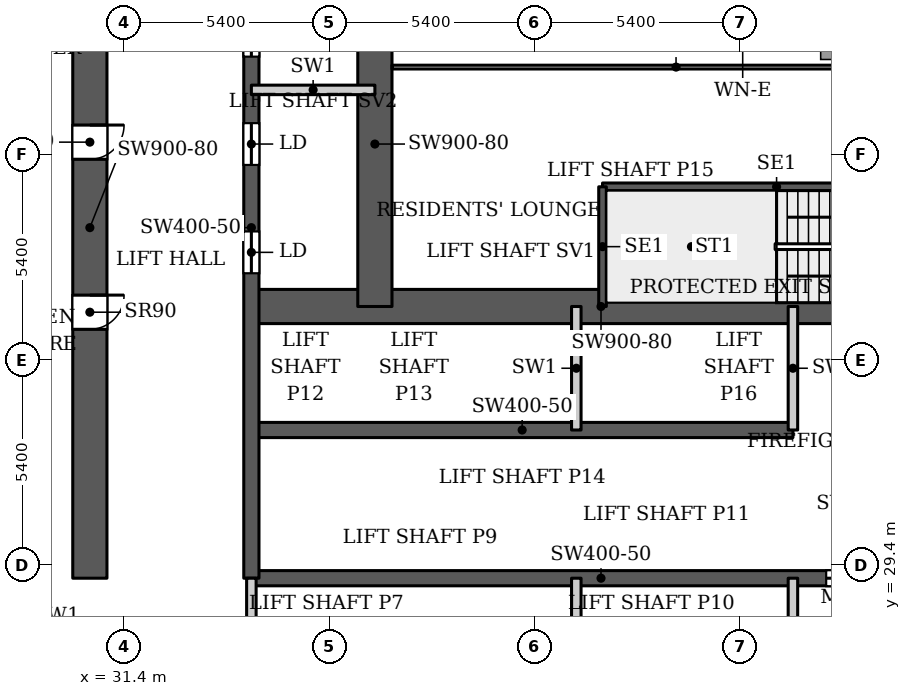
"""IFC4 building model, lengths in metres.
Left out: names, types, materials, properties, quantities, classifications, styles, units other than length and angle.
Written with IfcOpenShell. Run it as: python <this file> out.ifc"""

import sys

from ifc_helpers import new_model, si_unit, direction, frame, frame_2d, origin, place, context, subcontext, project, spatial, rectangle, extrude, source, transform, mapped, element, fill, save


model = new_model("IFC4")
c1 = context("Model", 3, precision=1e-05, world=origin(), true_north=direction((0.0, 1.0)))
c2 = subcontext(c1, "Body", "Model", "MODEL_VIEW")
j1 = project(units=[si_unit("LENGTHUNIT", "METRE"), si_unit("PLANEANGLEUNIT", "RADIAN")], contexts=[c1])
p1 = place(None, origin())
s1 = spatial("IfcSite", under=j1, at=p1, CompositionType="ELEMENT")
p2 = place(p1, origin())
s2 = spatial("IfcBuilding", under=s1, at=p2, CompositionType="ELEMENT")
p3 = place(p2, frame((0.0, 0.0, 125.3)))
s3 = spatial("IfcBuildingStorey", under=s2, at=p3, CompositionType="ELEMENT", Elevation=125.3)
p4 = place(p3, frame((34.75, 29.05, 0.0), z_axis=(0.0, 0.0, 1.0), x_axis=(1.0, 0.0, 0.0)))
e1 = element("IfcWall", 1, at=p4, inside=s3, PredefinedType="SHEAR", context=c2, shape_type="SweptSolid", body=[
    extrude(rectangle(XDim=18.4, YDim=0.4, at=frame_2d((9.2, 0.0))), origin(), (0.0, 0.0, 1.0), 3.9),
])
p5 = place(p4, frame((15.125, 0.0, 0.0)))
e2 = element("IfcOpeningElement", 2, at=p5, cuts=e1, PredefinedType="OPENING", context=c2, shape_type="SweptSolid", body=[
    extrude(rectangle(XDim=1.1, YDim=2.2, at=frame_2d((0.55, 1.1))), frame((0.0, 0.21, 0.0), z_axis=(0.0, -1.0, 0.0), x_axis=(1.0, 0.0, 0.0)), (0.0, 0.0, 1.0), 0.42),
])
p6 = place(p3, frame((34.75, 32.95, 0.0), z_axis=(0.0, 0.0, 1.0), x_axis=(1.0, 0.0, 0.0)))
e3 = element("IfcWall", 3, at=p6, inside=s3, PredefinedType="SHEAR", context=c2, shape_type="SweptSolid", body=[
    extrude(rectangle(XDim=14.25, YDim=0.4, at=frame_2d((7.125, 0.0))), origin(), (0.0, 0.0, 1.0), 3.9),
])
p7 = place(p3, frame((34.75, 36.2, 0.0), z_axis=(0.0, 0.0, 1.0), x_axis=(1.0, 0.0, 0.0)))
e4 = element("IfcWall", 4, at=p7, inside=s3, PredefinedType="SHEAR", context=c2, shape_type="SweptSolid", body=[
    extrude(rectangle(XDim=18.4, YDim=0.9, at=frame_2d((9.2, 0.0))), origin(), (0.0, 0.0, 1.0), 3.9),
])
p8 = place(p7, frame((16.9, 0.0, 0.0)))
e5 = element("IfcOpeningElement", 5, at=p8, cuts=e4, PredefinedType="OPENING", context=c2, shape_type="SweptSolid", body=[
    extrude(rectangle(XDim=1.0, YDim=2.2, at=frame_2d((0.5, 1.1))), frame((0.0, 0.46, 0.0), z_axis=(0.0, -1.0, 0.0), x_axis=(1.0, 0.0, 0.0)), (0.0, 0.0, 1.0), 0.92),
])
p9 = place(p3, frame((34.75, 29.05, 0.0), z_axis=(0.0, 0.0, 1.0), x_axis=(0.0, 1.0, 0.0)))
e6 = element("IfcWall", 6, at=p9, inside=s3, PredefinedType="SHEAR", context=c2, shape_type="SweptSolid", body=[
    extrude(rectangle(XDim=18.45, YDim=0.4, at=frame_2d((9.225, 0.0))), origin(), (0.0, 0.0, 1.0), 3.9),
])
p10 = place(p9, frame((8.025, 0.0, 0.0)))
e7 = element("IfcOpeningElement", 7, at=p10, cuts=e6, PredefinedType="OPENING", context=c2, shape_type="SweptSolid", body=[
    extrude(rectangle(XDim=1.1, YDim=2.2, at=frame_2d((0.55, 1.1))), frame((0.0, 0.21, 0.0), z_axis=(0.0, -1.0, 0.0), x_axis=(1.0, 0.0, 0.0)), (0.0, 0.0, 1.0), 0.42),
])
p11 = place(p9, frame((10.875, 0.0, 0.0)))
e8 = element("IfcOpeningElement", 8, at=p11, cuts=e6, PredefinedType="OPENING", context=c2, shape_type="SweptSolid", body=[
    extrude(rectangle(XDim=1.1, YDim=2.2, at=frame_2d((0.55, 1.1))), frame((0.0, 0.21, 0.0), z_axis=(0.0, -1.0, 0.0), x_axis=(1.0, 0.0, 0.0)), (0.0, 0.0, 1.0), 0.42),
])
p12 = place(p9, frame((13.725, 0.0, 0.0)))
e9 = element("IfcOpeningElement", 9, at=p12, cuts=e6, PredefinedType="OPENING", context=c2, shape_type="SweptSolid", body=[
    extrude(rectangle(XDim=1.1, YDim=2.2, at=frame_2d((0.55, 1.1))), frame((0.0, 0.21, 0.0), z_axis=(0.0, -1.0, 0.0), x_axis=(1.0, 0.0, 0.0)), (0.0, 0.0, 1.0), 0.42),
])
p13 = place(p9, frame((15.95, 0.0, 0.0)))
e10 = element("IfcOpeningElement", 10, at=p13, cuts=e6, PredefinedType="OPENING", context=c2, shape_type="SweptSolid", body=[
    extrude(rectangle(XDim=1.1, YDim=2.2, at=frame_2d((0.55, 1.1))), frame((0.0, 0.21, 0.0), z_axis=(0.0, -1.0, 0.0), x_axis=(1.0, 0.0, 0.0)), (0.0, 0.0, 1.0), 0.42),
])
p14 = place(p3, frame((38.0, 36.2, 0.0), z_axis=(0.0, 0.0, 1.0), x_axis=(0.0, 1.0, 0.0)))
e11 = element("IfcWall", 11, at=p14, inside=s3, PredefinedType="SHEAR", context=c2, shape_type="SweptSolid", body=[
    extrude(rectangle(XDim=8.55, YDim=0.9, at=frame_2d((4.275, 0.0))), origin(), (0.0, 0.0, 1.0), 3.9),
])
p15 = place(p3, frame((30.5, 29.05, 0.0), z_axis=(0.0, 0.0, 1.0), x_axis=(0.0, 1.0, 0.0)))
e12 = element("IfcWall", 12, at=p15, inside=s3, PredefinedType="SHEAR", context=c2, shape_type="SweptSolid", body=[
    extrude(rectangle(XDim=18.45, YDim=0.9, at=frame_2d((9.225, 0.0))), origin(), (0.0, 0.0, 1.0), 3.9),
])
p16 = place(p15, frame((6.55, 0.0, 0.0)))
e13 = element("IfcOpeningElement", 13, at=p16, cuts=e12, PredefinedType="OPENING", context=c2, shape_type="SweptSolid", body=[
    extrude(rectangle(XDim=0.9, YDim=2.2, at=frame_2d((0.45, 1.1))), frame((0.0, 0.46, 0.0), z_axis=(0.0, -1.0, 0.0), x_axis=(1.0, 0.0, 0.0)), (0.0, 0.0, 1.0), 0.92),
])
p17 = place(p15, frame((11.025, 0.0, 0.0)))
e14 = element("IfcOpeningElement", 14, at=p17, cuts=e12, PredefinedType="OPENING", context=c2, shape_type="SweptSolid", body=[
    extrude(rectangle(XDim=0.9, YDim=2.2, at=frame_2d((0.45, 1.1))), frame((0.0, 0.46, 0.0), z_axis=(0.0, -1.0, 0.0), x_axis=(1.0, 0.0, 0.0)), (0.0, 0.0, 1.0), 0.92),
])
p18 = place(p3, frame((29.712, 26.072, 0.0), z_axis=(0.0, 0.0, 1.0), x_axis=(-0.511028049012, 0.859564036662, 0.0)))
e15 = element("IfcWall", 15, at=p18, inside=s3, PredefinedType="SOLIDWALL", context=c2, shape_type="SweptSolid", body=[
    extrude(rectangle(XDim=4.634, YDim=0.25, at=frame_2d((2.317, 0.0))), origin(), (0.0, 0.0, 1.0), 3.147),
])
p19 = place(p3, frame((27.195, 31.969, 0.0), z_axis=(0.0, 0.0, 1.0), x_axis=(0.052554995867, 0.998618031286, 0.0)))
e16 = element("IfcWall", 16, at=p19, inside=s3, PredefinedType="SOLIDWALL", context=c2, shape_type="SweptSolid", body=[
    extrude(rectangle(XDim=66.787, YDim=0.25, at=frame_2d((33.394, 0.0))), origin(), (0.0, 0.0, 1.0), 3.75),
])
p20 = place(p3, frame((43.99, 39.35, 0.0), z_axis=(0.0, 0.0, 1.0), x_axis=(1.0, 0.0, 0.0)))
e17 = element("IfcWall", 17, at=p20, inside=s3, PredefinedType="SHEAR", context=c2, shape_type="SweptSolid", body=[
    extrude(rectangle(XDim=9.16, YDim=0.2, at=frame_2d((4.58, 0.0))), origin(), (0.0, 0.0, 1.0), 3.9),
])
p21 = place(p3, frame((43.99, 36.2, 0.0), z_axis=(0.0, 0.0, 1.0), x_axis=(0.0, 1.0, 0.0)))
e18 = element("IfcWall", 18, at=p21, inside=s3, PredefinedType="SHEAR", context=c2, shape_type="SweptSolid", body=[
    extrude(rectangle(XDim=3.15, YDim=0.2, at=frame_2d((1.575, 0.0))), origin(), (0.0, 0.0, 1.0), 3.9),
])
for number, where, z_axis, x_axis in (
    (19, (34.75, 25.8, 0.0), (0.0, 0.0, 1.0), (0.0, 1.0, 0.0)),
    (20, (43.3, 25.8, 0.0), (0.0, 0.0, 1.0), (0.0, 1.0, 0.0)),
    (21, (43.3, 32.95, 0.0), (0.0, 0.0, 1.0), (0.0, 1.0, 0.0)),
    (22, (49.0, 25.8, 0.0), (0.0, 0.0, 1.0), (0.0, 1.0, 0.0)),
    (23, (49.0, 32.95, 0.0), (0.0, 0.0, 1.0), (0.0, 1.0, 0.0)),
    (24, (34.75, 41.9, 0.0), (0.0, 0.0, 1.0), (1.0, 0.0, 0.0)),
):
    element("IfcWall", number, at=place(p3, frame(where, z_axis=z_axis, x_axis=x_axis)), inside=s3, PredefinedType="PARTITIONING", context=c2, shape_type="SweptSolid", body=[
        extrude(rectangle(XDim=3.25, YDim=0.25, at=frame_2d((1.625, 0.0))), origin(), (0.0, 0.0, 1.0), 3.9),
    ])
p22 = place(p3, frame((38.449, 42.5, 0.0), z_axis=(0.0, 0.0, 1.0), x_axis=(1.0, 0.0, 0.0)))
e25 = element("IfcWall", 25, at=p22, inside=s3, PredefinedType="PARTITIONING", context=c2, shape_type="SweptSolid", body=[
    extrude(rectangle(XDim=14.951, YDim=0.1, at=frame_2d((7.476, 0.0))), origin(), (0.0, 0.0, 1.0), 3.6),
])
m1 = source(origin(), c2, "Body", "SweptSolid", [
    extrude(rectangle(XDim=1.1, YDim=2.2, at=frame_2d((0.55, 1.1))), frame((0.0, 0.025, 0.0), z_axis=(0.0, -1.0, 0.0), x_axis=(1.0, 0.0, 0.0)), (0.0, 0.0, 1.0), 0.05),
])
p23 = place(p10, origin())
e26 = element("IfcDoor", 26, at=p23, inside=s3, OperationType="SLIDING_TO_LEFT", PredefinedType="DOOR", context=c2, shape_type="MappedRepresentation", body=[
    mapped(m1, transform((0.0, 0.0, 0.0), x_axis=(1.0, 0.0, 0.0), y_axis=(0.0, 1.0, 0.0), z_axis=(0.0, 0.0, 1.0), scale=1.0)),
])
fill(e7, e26)
p24 = place(p11, origin())
e27 = element("IfcDoor", 27, at=p24, inside=s3, OperationType="SLIDING_TO_LEFT", PredefinedType="DOOR", context=c2, shape_type="MappedRepresentation", body=[
    mapped(m1, transform((0.0, 0.0, 0.0), x_axis=(1.0, 0.0, 0.0), y_axis=(0.0, 1.0, 0.0), z_axis=(0.0, 0.0, 1.0), scale=1.0)),
])
fill(e8, e27)
p25 = place(p12, origin())
e28 = element("IfcDoor", 28, at=p25, inside=s3, OperationType="SLIDING_TO_LEFT", PredefinedType="DOOR", context=c2, shape_type="MappedRepresentation", body=[
    mapped(m1, transform((0.0, 0.0, 0.0), x_axis=(1.0, 0.0, 0.0), y_axis=(0.0, 1.0, 0.0), z_axis=(0.0, 0.0, 1.0), scale=1.0)),
])
fill(e9, e28)
p26 = place(p5, origin())
e29 = element("IfcDoor", 29, at=p26, inside=s3, OperationType="SLIDING_TO_LEFT", PredefinedType="DOOR", context=c2, shape_type="MappedRepresentation", body=[
    mapped(m1, transform((0.0, 0.0, 0.0), x_axis=(1.0, 0.0, 0.0), y_axis=(0.0, 1.0, 0.0), z_axis=(0.0, 0.0, 1.0), scale=1.0)),
])
fill(e2, e29)
m2 = source(origin(), c2, "Body", "SweptSolid", [
    extrude(rectangle(XDim=0.9, YDim=2.2, at=frame_2d((0.45, 1.1))), frame((0.0, 0.025, 0.0), z_axis=(0.0, -1.0, 0.0), x_axis=(1.0, 0.0, 0.0)), (0.0, 0.0, 1.0), 0.05),
])
p27 = place(p16, origin())
e30 = element("IfcDoor", 30, at=p27, inside=s3, OperationType="SINGLE_SWING_RIGHT", PredefinedType="DOOR", context=c2, shape_type="MappedRepresentation", body=[
    mapped(m2, transform((0.0, 0.0, 0.0), x_axis=(1.0, 0.0, 0.0), y_axis=(0.0, 1.0, 0.0), z_axis=(0.0, 0.0, 1.0), scale=1.0)),
])
fill(e13, e30)
p28 = place(p17, origin())
e31 = element("IfcDoor", 31, at=p28, inside=s3, OperationType="SINGLE_SWING_RIGHT", PredefinedType="DOOR", context=c2, shape_type="MappedRepresentation", body=[
    mapped(m2, transform((0.0, 0.0, 0.0), x_axis=(1.0, 0.0, 0.0), y_axis=(0.0, 1.0, 0.0), z_axis=(0.0, 0.0, 1.0), scale=1.0)),
])
fill(e14, e31)
save(model, sys.argv[1])
